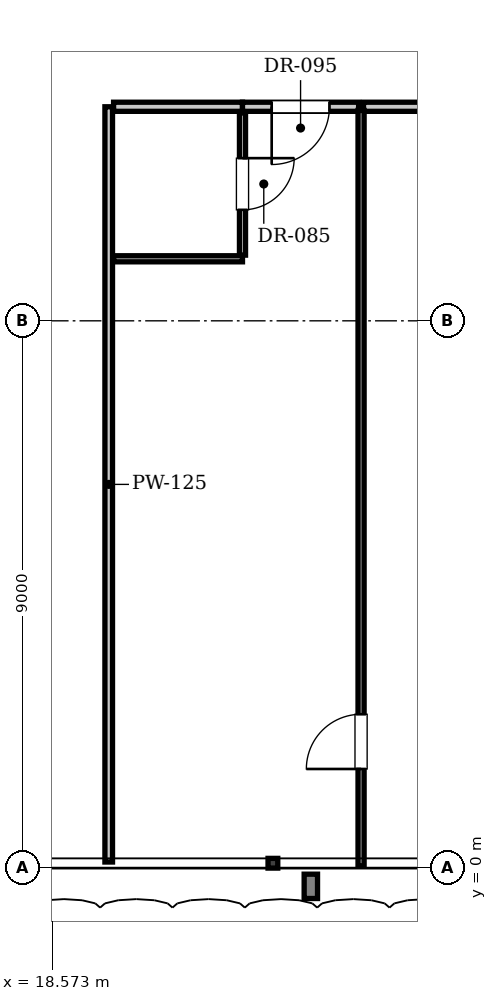
"""IFC4 building model, lengths in metres.
Left out: names, types, materials, properties, quantities, classifications, styles, units other than length and angle.
Written with IfcOpenShell. Run it as: python <this file> out.ifc"""

import sys

from ifc_helpers import new_model, si_unit, direction, frame, frame_2d, origin, place, context, subcontext, project, spatial, rectangle, extrude, element, fill, save


model = new_model("IFC4")
c1 = context("Model", 3, precision=1e-05, world=origin(), true_north=direction((0.0, 1.0)))
c2 = subcontext(c1, "Body", "Model", "MODEL_VIEW")
j1 = project(units=[si_unit("LENGTHUNIT", "METRE"), si_unit("PLANEANGLEUNIT", "RADIAN")], contexts=[c1])
p1 = place(None, origin())
s1 = spatial("IfcSite", under=j1, at=p1, CompositionType="ELEMENT")
p2 = place(p1, origin())
s2 = spatial("IfcBuilding", under=s1, at=p2, CompositionType="ELEMENT")
p3 = place(p2, frame((0.0, 0.0, 34.65)))
s3 = spatial("IfcBuildingStorey", under=s2, at=p3, CompositionType="ELEMENT", Elevation=34.65)
p4 = place(p3, frame((19.5, 0.1, 0.0), z_axis=(0.0, 0.0, 1.0), x_axis=(0.0, 1.0, 0.0)))
e1 = element("IfcWall", 1, at=p4, inside=s3, PredefinedType="PARTITIONING", context=c2, shape_type="SweptSolid", body=[
    extrude(rectangle(XDim=12.42, YDim=0.125, at=frame_2d((6.21, 0.0))), origin(), (0.0, 0.0, 1.0), 3.61),
])
p5 = place(p3, frame((19.58, 12.52, 0.0), z_axis=(0.0, 0.0, 1.0), x_axis=(1.0, 0.0, 0.0)))
e2 = element("IfcWall", 2, at=p5, inside=s3, PredefinedType="PARTITIONING", context=c2, shape_type="SweptSolid", body=[
    extrude(rectangle(XDim=2.12, YDim=0.15, at=frame_2d((1.06, 0.0))), origin(), (0.0, 0.0, 1.0), 3.61),
])
p6 = place(p3, frame((19.58, 10.02, 0.0), z_axis=(0.0, 0.0, 1.0), x_axis=(1.0, 0.0, 0.0)))
e3 = element("IfcWall", 3, at=p6, inside=s3, PredefinedType="PARTITIONING", context=c2, shape_type="SweptSolid", body=[
    extrude(rectangle(XDim=2.12, YDim=0.1, at=frame_2d((1.06, 0.0))), origin(), (0.0, 0.0, 1.0), 3.61),
])
p7 = place(p3, frame((21.7, 10.08, 0.0), z_axis=(0.0, 0.0, 1.0), x_axis=(0.0, 1.0, 0.0)))
e4 = element("IfcWall", 4, at=p7, inside=s3, PredefinedType="PARTITIONING", context=c2, shape_type="SweptSolid", body=[
    extrude(rectangle(XDim=2.34, YDim=0.1, at=frame_2d((1.17, 0.0))), origin(), (0.0, 0.0, 1.0), 3.61),
])
p8 = place(p7, frame((0.745, 0.0, 0.0)))
e5 = element("IfcOpeningElement", 5, at=p8, cuts=e4, PredefinedType="OPENING", context=c2, shape_type="SweptSolid", body=[
    extrude(rectangle(XDim=0.85, YDim=2.1, at=frame_2d((0.425, 1.05))), frame((0.0, 0.06, 0.0), z_axis=(0.0, -1.0, 0.0), x_axis=(1.0, 0.0, 0.0)), (0.0, 0.0, 1.0), 0.12),
])
p9 = place(p3, frame((21.7, 12.52, 0.0), z_axis=(0.0, 0.0, 1.0), x_axis=(1.0, 0.0, 0.0)))
e6 = element("IfcWall", 6, at=p9, inside=s3, PredefinedType="PARTITIONING", context=c2, shape_type="SweptSolid", body=[
    extrude(rectangle(XDim=1.91, YDim=0.15, at=frame_2d((0.955, 0.0))), origin(), (0.0, 0.0, 1.0), 3.61),
])
p10 = place(p9, frame((0.48, 0.0, 0.0)))
e7 = element("IfcOpeningElement", 7, at=p10, cuts=e6, PredefinedType="OPENING", context=c2, shape_type="SweptSolid", body=[
    extrude(rectangle(XDim=0.95, YDim=2.15, at=frame_2d((0.475, 1.075))), frame((0.0, 0.085, 0.0), z_axis=(0.0, -1.0, 0.0), x_axis=(1.0, 0.0, 0.0)), (0.0, 0.0, 1.0), 0.17),
])
p11 = place(p3, frame((23.69, 12.52, 0.0), z_axis=(0.0, 0.0, 1.0), x_axis=(1.0, 0.0, 0.0)))
e8 = element("IfcWall", 8, at=p11, inside=s3, PredefinedType="PARTITIONING", context=c2, shape_type="SweptSolid", body=[
    extrude(rectangle(XDim=1.89, YDim=0.15, at=frame_2d((0.945, 0.0))), origin(), (0.0, 0.0, 1.0), 3.61),
])
p12 = place(p3, frame((23.65, 0.03, 0.0), z_axis=(0.0, 0.0, 1.0), x_axis=(0.0, 1.0, 0.0)))
e9 = element("IfcWall", 9, at=p12, inside=s3, PredefinedType="PARTITIONING", context=c2, shape_type="SweptSolid", body=[
    extrude(rectangle(XDim=12.43, YDim=0.1, at=frame_2d((6.215, 0.0))), origin(), (0.0, 0.0, 1.0), 3.61),
])
p13 = place(p12, frame((1.6, 0.0, 0.0)))
e10 = element("IfcOpeningElement", 10, at=p13, cuts=e9, PredefinedType="OPENING", context=c2, shape_type="SweptSolid", body=[
    extrude(rectangle(XDim=0.9, YDim=2.1, at=frame_2d((0.45, 1.05))), frame((0.0, 0.06, 0.0), z_axis=(0.0, -1.0, 0.0), x_axis=(1.0, 0.0, 0.0)), (0.0, 0.0, 1.0), 0.12),
])
p14 = place(p8, frame((0.85, 0.0, 0.0), z_axis=(0.0, 0.0, 1.0), x_axis=(-1.0, 0.0, 0.0)))
e11 = element("IfcDoor", 11, at=p14, inside=s3, OperationType="SINGLE_SWING_LEFT", PredefinedType="DOOR", context=c2, shape_type="SweptSolid", body=[
    extrude(rectangle(XDim=0.85, YDim=2.1, at=frame_2d((0.425, 1.05))), frame((0.0, 0.025, 0.0), z_axis=(0.0, -1.0, 0.0), x_axis=(1.0, 0.0, 0.0)), (0.0, 0.0, 1.0), 0.05),
])
fill(e5, e11)
p15 = place(p10, frame((0.95, 0.0, 0.0), z_axis=(0.0, 0.0, 1.0), x_axis=(-1.0, 0.0, 0.0)))
e12 = element("IfcDoor", 12, at=p15, inside=s3, OperationType="SINGLE_SWING_RIGHT", PredefinedType="DOOR", context=c2, shape_type="SweptSolid", body=[
    extrude(rectangle(XDim=0.95, YDim=2.15, at=frame_2d((0.475, 1.075))), frame((0.0, 0.025, 0.0), z_axis=(0.0, -1.0, 0.0), x_axis=(1.0, 0.0, 0.0)), (0.0, 0.0, 1.0), 0.05),
])
fill(e7, e12)
p16 = place(p13, origin())
e13 = element("IfcDoor", 13, at=p16, inside=s3, OperationType="SINGLE_SWING_LEFT", PredefinedType="DOOR", context=c2, shape_type="SweptSolid", body=[
    extrude(rectangle(XDim=0.9, YDim=2.1, at=frame_2d((0.45, 1.05))), frame((0.0, 0.025, 0.0), z_axis=(0.0, -1.0, 0.0), x_axis=(1.0, 0.0, 0.0)), (0.0, 0.0, 1.0), 0.05),
])
fill(e10, e13)
save(model, sys.argv[1])
